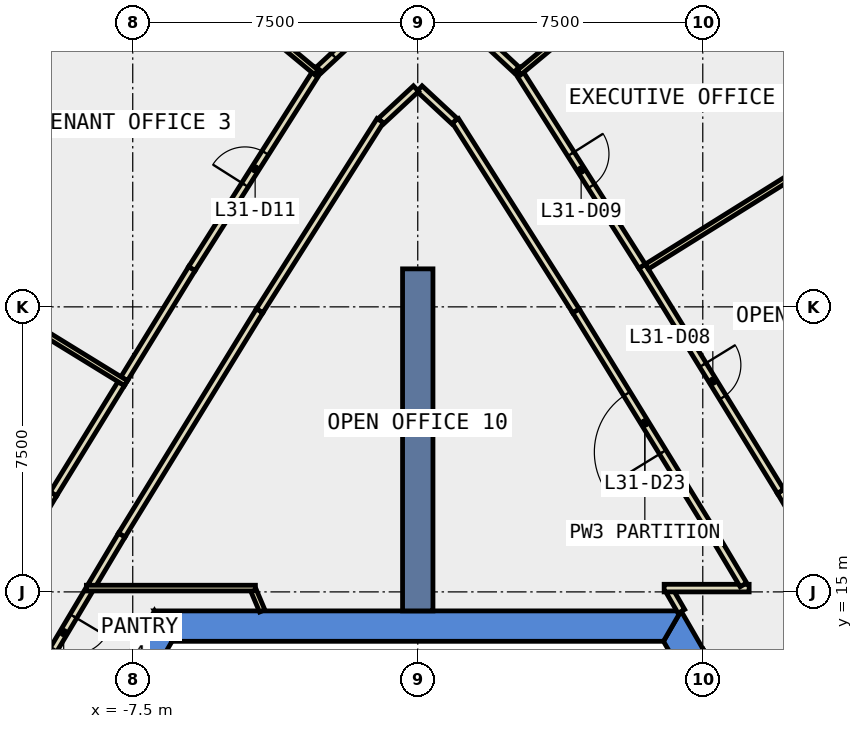
"""IFC4 building model, lengths in metres.
Left out: names, types, materials, properties, quantities, classifications, styles, units other than length and angle.
Written with IfcOpenShell. Run it as: python <this file> out.ifc"""

import sys

from ifc_helpers import new_model, si_unit, direction, frame, frame_2d, origin, place, context, subcontext, project, spatial, polyline, rectangle, outline, extrude, element, fill, save


model = new_model("IFC4")
c1 = context("Model", 3, precision=1e-05, world=origin(), true_north=direction((0.0, 1.0)))
c2 = subcontext(c1, "Body", "Model", "MODEL_VIEW")
j1 = project(units=[si_unit("LENGTHUNIT", "METRE"), si_unit("PLANEANGLEUNIT", "RADIAN")], contexts=[c1])
p1 = place(None, origin())
s1 = spatial("IfcSite", under=j1, at=p1, CompositionType="ELEMENT")
p2 = place(p1, origin())
s2 = spatial("IfcBuilding", under=s1, at=p2, CompositionType="ELEMENT")
p3 = place(p2, frame((0.0, 0.0, 142.4)))
s3 = spatial("IfcBuildingStorey", under=s2, at=p3, CompositionType="ELEMENT", Elevation=142.4)
p4 = place(p3, frame((0.0, 0.0, -0.4)))
e1 = element("IfcWall", 1, at=p4, inside=s3, PredefinedType="SHEAR", context=c2, shape_type="SweptSolid", body=[
    extrude(outline(polyline([(6.824, 13.08), (7.517, 13.48), (6.928, 14.5), (6.466, 13.7), (6.824, 13.08)])), origin(), (0.0, 0.0, 1.0), 4.2),
])
p5 = place(p3, frame((0.0, 0.0, -0.4)))
e2 = element("IfcWall", 2, at=p5, inside=s3, PredefinedType="SHEAR", context=c2, shape_type="SweptSolid", body=[
    extrude(outline(polyline([(6.928, 14.5), (-6.928, 14.5), (-6.466, 13.7), (6.466, 13.7), (6.928, 14.5)])), origin(), (0.0, 0.0, 1.0), 4.2),
])
p6 = place(p3, frame((0.0, 0.0, -0.4)))
e3 = element("IfcWall", 3, at=p6, inside=s3, PredefinedType="SHEAR", context=c2, shape_type="SweptSolid", body=[
    extrude(outline(polyline([(-12.267, 5.252), (-11.575, 4.852), (-6.466, 13.7), (-6.928, 14.5), (-12.267, 5.252)])), origin(), (0.0, 0.0, 1.0), 4.2),
])
p7 = place(p3, frame((0.0, 14.5, -0.4), z_axis=(0.0, 0.0, 1.0), x_axis=(0.0, 1.0, 0.0)))
e4 = element("IfcWall", 4, at=p7, inside=s3, PredefinedType="SHEAR", context=c2, shape_type="SweptSolid", body=[
    extrude(rectangle(XDim=9.0, YDim=0.8, at=frame_2d((4.5, 0.0))), origin(), (0.0, 0.0, 1.0), 4.2),
])
p8 = place(p3, frame((11.375, 27.545, 0.0), z_axis=(0.0, 0.0, 1.0), x_axis=(-0.535403761464, 0.844596242124, 0.0)))
e5 = element("IfcWall", 5, at=p8, inside=s3, PredefinedType="STANDARD", context=c2, shape_type="SweptSolid", body=[
    extrude(rectangle(XDim=5.928, YDim=0.3, at=frame_2d((2.964, 0.0))), origin(), (0.0, 0.0, 1.0), 3.8),
])
p9 = place(p8, frame((0.482, 0.0, 0.9)))
e6 = element("IfcOpeningElement", 6, at=p9, cuts=e5, PredefinedType="OPENING", context=c2, shape_type="SweptSolid", body=[
    extrude(rectangle(XDim=2.0, YDim=2.6, at=frame_2d((1.0, 1.3))), frame((0.0, 0.16, 0.0), z_axis=(0.0, -1.0, 0.0), x_axis=(1.0, 0.0, 0.0)), (0.0, 0.0, 1.0), 0.32),
])
p10 = place(p8, frame((3.446, 0.0, 0.9)))
e7 = element("IfcOpeningElement", 7, at=p10, cuts=e5, PredefinedType="OPENING", context=c2, shape_type="SweptSolid", body=[
    extrude(rectangle(XDim=2.0, YDim=2.6, at=frame_2d((1.0, 1.3))), frame((0.0, 0.16, 0.0), z_axis=(0.0, -1.0, 0.0), x_axis=(1.0, 0.0, 0.0)), (0.0, 0.0, 1.0), 0.32),
])
p11 = place(p3, frame((-8.201, 32.552, 0.0), z_axis=(0.0, 0.0, 1.0), x_axis=(-0.535403761464, -0.844596242124, 0.0)))
e8 = element("IfcWall", 8, at=p11, inside=s3, PredefinedType="STANDARD", context=c2, shape_type="SweptSolid", body=[
    extrude(rectangle(XDim=5.928, YDim=0.3, at=frame_2d((2.964, 0.0))), origin(), (0.0, 0.0, 1.0), 3.8),
])
p12 = place(p11, frame((0.482, 0.0, 0.9)))
e9 = element("IfcOpeningElement", 9, at=p12, cuts=e8, PredefinedType="OPENING", context=c2, shape_type="SweptSolid", body=[
    extrude(rectangle(XDim=2.0, YDim=2.6, at=frame_2d((1.0, 1.3))), frame((0.0, 0.16, 0.0), z_axis=(0.0, -1.0, 0.0), x_axis=(1.0, 0.0, 0.0)), (0.0, 0.0, 1.0), 0.32),
])
p13 = place(p11, frame((3.446, 0.0, 0.9)))
e10 = element("IfcOpeningElement", 10, at=p13, cuts=e8, PredefinedType="OPENING", context=c2, shape_type="SweptSolid", body=[
    extrude(rectangle(XDim=2.0, YDim=2.6, at=frame_2d((1.0, 1.3))), frame((0.0, 0.16, 0.0), z_axis=(0.0, -1.0, 0.0), x_axis=(1.0, 0.0, 0.0)), (0.0, 0.0, 1.0), 0.32),
])
p14 = place(p3, frame((-8.658, 15.036, 0.0), z_axis=(0.0, 0.0, 1.0), x_axis=(-0.511860217954, -0.859068750029, 0.0)))
e11 = element("IfcWall", 11, at=p14, inside=s3, PredefinedType="PARTITIONING", context=c2, shape_type="SweptSolid", body=[
    extrude(rectangle(XDim=2.577, YDim=0.2, at=frame_2d((1.289, 0.0))), origin(), (0.0, 0.0, 1.0), 3.8),
])
p15 = place(p14, frame((0.788, 0.0, 0.0)))
e12 = element("IfcOpeningElement", 12, at=p15, cuts=e11, PredefinedType="OPENING", context=c2, shape_type="SweptSolid", body=[
    extrude(rectangle(XDim=1.0, YDim=2.1, at=frame_2d((0.5, 1.05))), frame((0.0, 0.11, 0.0), z_axis=(0.0, -1.0, 0.0), x_axis=(1.0, 0.0, 0.0)), (0.0, 0.0, 1.0), 0.22),
])
p16 = place(p3, frame((6.937, 14.488, 0.0), z_axis=(0.0, 0.0, 1.0), x_axis=(-0.499908430952, 0.866078264744, 0.0)))
e13 = element("IfcWall", 13, at=p16, inside=s3, PredefinedType="PARTITIONING", context=c2, shape_type="SweptSolid", body=[
    extrude(rectangle(XDim=0.606, YDim=0.2, at=frame_2d((0.303, 0.0))), origin(), (0.0, 0.0, 1.0), 3.8),
])
p17 = place(p3, frame((6.484, 15.1, 0.0), z_axis=(0.0, 0.0, 1.0), x_axis=(1.0, 0.0, 0.0)))
e14 = element("IfcWall", 14, at=p17, inside=s3, PredefinedType="PARTITIONING", context=c2, shape_type="SweptSolid", body=[
    extrude(rectangle(XDim=2.236, YDim=0.2, at=frame_2d((1.118, 0.0))), origin(), (0.0, 0.0, 1.0), 3.8),
])
p18 = place(p3, frame((8.569, 15.186, 0.0), z_axis=(0.0, 0.0, 1.0), x_axis=(-0.512230585803, 0.85884796499, 0.0)))
e15 = element("IfcWall", 15, at=p18, inside=s3, PredefinedType="PARTITIONING", context=c2, shape_type="SweptSolid", body=[
    extrude(rectangle(XDim=1.523, YDim=0.2, at=frame_2d((0.761, 0.0))), origin(), (0.0, 0.0, 1.0), 3.8),
])
p19 = place(p3, frame((7.789, 16.494, 0.0), z_axis=(0.0, 0.0, 1.0), x_axis=(-0.523625371849, 0.851948631055, 0.0)))
e16 = element("IfcWall", 16, at=p19, inside=s3, PredefinedType="PARTITIONING", context=c2, shape_type="SweptSolid", body=[
    extrude(rectangle(XDim=6.927, YDim=0.2, at=frame_2d((3.463, 0.0))), origin(), (0.0, 0.0, 1.0), 3.8),
])
p20 = place(p19, frame((2.564, 0.0, 0.0)))
e17 = element("IfcOpeningElement", 17, at=p20, cuts=e16, PredefinedType="OPENING", context=c2, shape_type="SweptSolid", body=[
    extrude(rectangle(XDim=1.8, YDim=2.1, at=frame_2d((0.9, 1.05))), frame((0.0, 0.11, 0.0), z_axis=(0.0, -1.0, 0.0), x_axis=(1.0, 0.0, 0.0)), (0.0, 0.0, 1.0), 0.22),
])
p21 = place(p3, frame((4.162, 22.395, 0.0), z_axis=(0.0, 0.0, 1.0), x_axis=(-0.535496886312, 0.844537201519, 0.0)))
e18 = element("IfcWall", 18, at=p21, inside=s3, PredefinedType="PARTITIONING", context=c2, shape_type="SweptSolid", body=[
    extrude(rectangle(XDim=5.927, YDim=0.2, at=frame_2d((2.964, 0.0))), origin(), (0.0, 0.0, 1.0), 3.8),
])
for number, where, z_axis, x_axis in (
    (19, (0.968, 27.385, 0.0), (0.0, 0.0, 1.0), (-0.733, 0.681, 0.0)),
    (20, (-0.046, 28.242, 0.0), (0.0, 0.0, 1.0), (-0.733, -0.681, 0.0)),
):
    element("IfcWall", number, at=place(p3, frame(where, z_axis=z_axis, x_axis=x_axis)), inside=s3, PredefinedType="PARTITIONING", context=c2, shape_type="SweptSolid", body=[
        extrude(rectangle(XDim=1.259, YDim=0.2, at=frame_2d((0.629, 0.0))), origin(), (0.0, 0.0, 1.0), 3.8),
    ])
p22 = place(p3, frame((-0.988, 27.401, 0.0), z_axis=(0.0, 0.0, 1.0), x_axis=(-0.535496886312, -0.844537201519, 0.0)))
e21 = element("IfcWall", 21, at=p22, inside=s3, PredefinedType="PARTITIONING", context=c2, shape_type="SweptSolid", body=[
    extrude(rectangle(XDim=5.927, YDim=0.2, at=frame_2d((2.964, 0.0))), origin(), (0.0, 0.0, 1.0), 3.8),
])
p23 = place(p3, frame((-4.162, 22.395, 0.0), z_axis=(0.0, 0.0, 1.0), x_axis=(-0.523625371849, -0.851948631055, 0.0)))
e22 = element("IfcWall", 22, at=p23, inside=s3, PredefinedType="PARTITIONING", context=c2, shape_type="SweptSolid", body=[
    extrude(rectangle(XDim=6.927, YDim=0.2, at=frame_2d((3.463, 0.0))), origin(), (0.0, 0.0, 1.0), 3.8),
])
p24 = place(p3, frame((-7.789, 16.494, 0.0), z_axis=(0.0, 0.0, 1.0), x_axis=(-0.511686277462, -0.859172365394, 0.0)))
e23 = element("IfcWall", 23, at=p24, inside=s3, PredefinedType="PARTITIONING", context=c2, shape_type="SweptSolid", body=[
    extrude(rectangle(XDim=1.548, YDim=0.2, at=frame_2d((0.774, 0.0))), origin(), (0.0, 0.0, 1.0), 3.8),
])
p25 = place(p3, frame((9.548, 17.645, 0.0), z_axis=(0.0, 0.0, 1.0), x_axis=(0.511822081848, -0.859091471575, 0.0)))
e24 = element("IfcWall", 24, at=p25, inside=s3, PredefinedType="PARTITIONING", context=c2, shape_type="SweptSolid", body=[
    extrude(rectangle(XDim=7.03, YDim=0.2, at=frame_2d((3.515, 0.0))), origin(), (0.0, 0.0, 1.0), 3.8),
])
p26 = place(p25, frame((3.015, 0.0, 0.0)))
e25 = element("IfcOpeningElement", 25, at=p26, cuts=e24, PredefinedType="OPENING", context=c2, shape_type="SweptSolid", body=[
    extrude(rectangle(XDim=1.0, YDim=2.1, at=frame_2d((0.5, 1.05))), frame((0.0, 0.11, 0.0), z_axis=(0.0, -1.0, 0.0), x_axis=(1.0, 0.0, 0.0)), (0.0, 0.0, 1.0), 0.22),
])
p27 = place(p3, frame((5.904, 23.571, 0.0), z_axis=(0.0, 0.0, 1.0), x_axis=(0.523647026552, -0.851935321244, 0.0)))
e26 = element("IfcWall", 26, at=p27, inside=s3, PredefinedType="PARTITIONING", context=c2, shape_type="SweptSolid", body=[
    extrude(rectangle(XDim=6.957, YDim=0.2, at=frame_2d((3.479, 0.0))), origin(), (0.0, 0.0, 1.0), 3.8),
])
p28 = place(p27, frame((3.053, 0.0, 0.0)))
e27 = element("IfcOpeningElement", 27, at=p28, cuts=e26, PredefinedType="OPENING", context=c2, shape_type="SweptSolid", body=[
    extrude(rectangle(XDim=1.0, YDim=2.1, at=frame_2d((0.5, 1.05))), frame((0.0, 0.11, 0.0), z_axis=(0.0, -1.0, 0.0), x_axis=(1.0, 0.0, 0.0)), (0.0, 0.0, 1.0), 0.22),
])
p29 = place(p3, frame((2.616, 28.754, 0.0), z_axis=(0.0, 0.0, 1.0), x_axis=(0.535405016332, -0.844595446641, 0.0)))
e28 = element("IfcWall", 28, at=p29, inside=s3, PredefinedType="PARTITIONING", context=c2, shape_type="SweptSolid", body=[
    extrude(rectangle(XDim=6.138, YDim=0.2, at=frame_2d((3.069, 0.0))), origin(), (0.0, 0.0, 1.0), 3.8),
])
p30 = place(p29, frame((2.644, 0.0, 0.0)))
e29 = element("IfcOpeningElement", 29, at=p30, cuts=e28, PredefinedType="OPENING", context=c2, shape_type="SweptSolid", body=[
    extrude(rectangle(XDim=1.0, YDim=2.1, at=frame_2d((0.5, 1.05))), frame((0.0, 0.11, 0.0), z_axis=(0.0, -1.0, 0.0), x_axis=(1.0, 0.0, 0.0)), (0.0, 0.0, 1.0), 0.22),
])
p31 = place(p3, frame((-2.597, 28.738, 0.0), z_axis=(0.0, 0.0, 1.0), x_axis=(0.73206471367, 0.681235095249, 0.0)))
e30 = element("IfcWall", 30, at=p31, inside=s3, PredefinedType="PARTITIONING", context=c2, shape_type="SweptSolid", body=[
    extrude(rectangle(XDim=2.065, YDim=0.2, at=frame_2d((1.033, 0.0))), origin(), (0.0, 0.0, 1.0), 3.8),
])
p32 = place(p31, frame((0.532, 0.0, 0.0)))
e31 = element("IfcOpeningElement", 31, at=p32, cuts=e30, PredefinedType="OPENING", context=c2, shape_type="SweptSolid", body=[
    extrude(rectangle(XDim=1.0, YDim=2.1, at=frame_2d((0.5, 1.05))), frame((0.0, 0.11, 0.0), z_axis=(0.0, -1.0, 0.0), x_axis=(1.0, 0.0, 0.0)), (0.0, 0.0, 1.0), 0.22),
])
p33 = place(p3, frame((1.085, 30.145, 0.0), z_axis=(0.0, 0.0, 1.0), x_axis=(0.73206471367, -0.681235095249, 0.0)))
e32 = element("IfcWall", 32, at=p33, inside=s3, PredefinedType="PARTITIONING", context=c2, shape_type="SweptSolid", body=[
    extrude(rectangle(XDim=2.065, YDim=0.2, at=frame_2d((1.033, 0.0))), origin(), (0.0, 0.0, 1.0), 3.8),
])
p34 = place(p3, frame((-7.725, 20.608, 0.0), z_axis=(0.0, 0.0, 1.0), x_axis=(0.523645038298, 0.851936543333, 0.0)))
e33 = element("IfcWall", 33, at=p34, inside=s3, PredefinedType="PARTITIONING", context=c2, shape_type="SweptSolid", body=[
    extrude(rectangle(XDim=3.403, YDim=0.2, at=frame_2d((1.702, 0.0))), origin(), (0.0, 0.0, 1.0), 3.8),
])
p35 = place(p3, frame((-5.943, 23.507, 0.0), z_axis=(0.0, 0.0, 1.0), x_axis=(0.535529721247, 0.844516380931, 0.0)))
e34 = element("IfcWall", 34, at=p35, inside=s3, PredefinedType="PARTITIONING", context=c2, shape_type="SweptSolid", body=[
    extrude(rectangle(XDim=6.213, YDim=0.2, at=frame_2d((3.106, 0.0))), origin(), (0.0, 0.0, 1.0), 3.8),
])
p36 = place(p35, frame((2.607, 0.0, 0.0)))
e35 = element("IfcOpeningElement", 35, at=p36, cuts=e34, PredefinedType="OPENING", context=c2, shape_type="SweptSolid", body=[
    extrude(rectangle(XDim=1.0, YDim=2.1, at=frame_2d((0.5, 1.05))), frame((0.0, 0.11, 0.0), z_axis=(0.0, -1.0, 0.0), x_axis=(1.0, 0.0, 0.0)), (0.0, 0.0, 1.0), 0.22),
])
p37 = place(p3, frame((-13.184, 11.542, 0.0), z_axis=(0.0, 0.0, 1.0), x_axis=(0.511847713534, 0.859076200433, 0.0)))
e36 = element("IfcWall", 36, at=p37, inside=s3, PredefinedType="PARTITIONING", context=c2, shape_type="SweptSolid", body=[
    extrude(rectangle(XDim=7.03, YDim=0.2, at=frame_2d((3.515, 0.0))), origin(), (0.0, 0.0, 1.0), 3.8),
])
p38 = place(p37, frame((3.015, 0.0, 0.0)))
e37 = element("IfcOpeningElement", 37, at=p38, cuts=e36, PredefinedType="OPENING", context=c2, shape_type="SweptSolid", body=[
    extrude(rectangle(XDim=1.0, YDim=2.1, at=frame_2d((0.5, 1.05))), frame((0.0, 0.11, 0.0), z_axis=(0.0, -1.0, 0.0), x_axis=(1.0, 0.0, 0.0)), (0.0, 0.0, 1.0), 0.22),
])
p39 = place(p3, frame((-9.586, 17.581, 0.0), z_axis=(0.0, 0.0, 1.0), x_axis=(0.523757261565, 0.851867554822, 0.0)))
e38 = element("IfcWall", 38, at=p39, inside=s3, PredefinedType="PARTITIONING", context=c2, shape_type="SweptSolid", body=[
    extrude(rectangle(XDim=3.404, YDim=0.2, at=frame_2d((1.702, 0.0))), origin(), (0.0, 0.0, 1.0), 3.8),
])
p40 = place(p3, frame((-4.272, 15.1, 0.0), z_axis=(0.0, 0.0, 1.0), x_axis=(-1.0, 0.0, 0.0)))
e39 = element("IfcWall", 39, at=p40, inside=s3, PredefinedType="PARTITIONING", context=c2, shape_type="SweptSolid", body=[
    extrude(rectangle(XDim=4.448, YDim=0.15, at=frame_2d((2.224, 0.0))), origin(), (0.0, 0.0, 1.0), 3.8),
])
p41 = place(p3, frame((-4.093, 14.5, 0.0), z_axis=(0.0, 0.0, 1.0), x_axis=(-0.390288929197, 0.92069243059, 0.0)))
e40 = element("IfcWall", 40, at=p41, inside=s3, PredefinedType="PARTITIONING", context=c2, shape_type="SweptSolid", body=[
    extrude(rectangle(XDim=0.577, YDim=0.15, at=frame_2d((0.288, 0.0))), origin(), (0.0, 0.0, 1.0), 3.8),
])
p42 = place(p3, frame((6.028, 23.56, 0.0), z_axis=(0.0, 0.0, 1.0), x_axis=(0.848246841914, 0.529601071734, 0.0)))
e41 = element("IfcWall", 41, at=p42, inside=s3, PredefinedType="PARTITIONING", context=c2, shape_type="SweptSolid", body=[
    extrude(rectangle(XDim=5.13, YDim=0.15, at=frame_2d((2.565, 0.0))), origin(), (0.0, 0.0, 1.0), 3.8),
])
for number, where, z_axis, x_axis in (
    (42, (2.67, 28.67, 0.0), (0.0, 0.0, 1.0), (0.769, 0.639, 0.0)),
    (43, (-2.67, 28.67, 0.0), (0.0, 0.0, 1.0), (-0.769, 0.639, 0.0)),
):
    element("IfcWall", number, at=place(p3, frame(where, z_axis=z_axis, x_axis=x_axis)), inside=s3, PredefinedType="PARTITIONING", context=c2, shape_type="SweptSolid", body=[
        extrude(rectangle(XDim=5.288, YDim=0.15, at=frame_2d((2.644, 0.0))), origin(), (0.0, 0.0, 1.0), 3.8),
    ])
p43 = place(p3, frame((-7.679, 20.492, 0.0), z_axis=(0.0, 0.0, 1.0), x_axis=(-0.851897179877, 0.523709074695, 0.0)))
e44 = element("IfcWall", 44, at=p43, inside=s3, PredefinedType="PARTITIONING", context=c2, shape_type="SweptSolid", body=[
    extrude(rectangle(XDim=6.7, YDim=0.15, at=frame_2d((3.35, 0.0))), origin(), (0.0, 0.0, 1.0), 3.8),
])
p44 = place(p28, origin())
e45 = element("IfcDoor", 45, at=p44, inside=s3, OperationType="SINGLE_SWING_LEFT", PredefinedType="DOOR", context=c2, shape_type="SweptSolid", body=[
    extrude(rectangle(XDim=1.0, YDim=2.1, at=frame_2d((0.5, 1.05))), frame((0.0, 0.025, 0.0), z_axis=(0.0, -1.0, 0.0), x_axis=(1.0, 0.0, 0.0)), (0.0, 0.0, 1.0), 0.05),
])
fill(e27, e45)
p45 = place(p30, origin())
e46 = element("IfcDoor", 46, at=p45, inside=s3, OperationType="SINGLE_SWING_LEFT", PredefinedType="DOOR", context=c2, shape_type="SweptSolid", body=[
    extrude(rectangle(XDim=1.0, YDim=2.1, at=frame_2d((0.5, 1.05))), frame((0.0, 0.025, 0.0), z_axis=(0.0, -1.0, 0.0), x_axis=(1.0, 0.0, 0.0)), (0.0, 0.0, 1.0), 0.05),
])
fill(e29, e46)
p46 = place(p32, origin())
e47 = element("IfcDoor", 47, at=p46, inside=s3, OperationType="SINGLE_SWING_LEFT", PredefinedType="DOOR", context=c2, shape_type="SweptSolid", body=[
    extrude(rectangle(XDim=1.0, YDim=2.1, at=frame_2d((0.5, 1.05))), frame((0.0, 0.025, 0.0), z_axis=(0.0, -1.0, 0.0), x_axis=(1.0, 0.0, 0.0)), (0.0, 0.0, 1.0), 0.05),
])
fill(e31, e47)
p47 = place(p36, origin())
e48 = element("IfcDoor", 48, at=p47, inside=s3, OperationType="SINGLE_SWING_LEFT", PredefinedType="DOOR", context=c2, shape_type="SweptSolid", body=[
    extrude(rectangle(XDim=1.0, YDim=2.1, at=frame_2d((0.5, 1.05))), frame((0.0, 0.025, 0.0), z_axis=(0.0, -1.0, 0.0), x_axis=(1.0, 0.0, 0.0)), (0.0, 0.0, 1.0), 0.05),
])
fill(e35, e48)
p48 = place(p20, origin())
e49 = element("IfcDoor", 49, at=p48, inside=s3, OperationType="DOUBLE_DOOR_SINGLE_SWING", PredefinedType="DOOR", context=c2, shape_type="SweptSolid", body=[
    extrude(rectangle(XDim=1.8, YDim=2.1, at=frame_2d((0.9, 1.05))), frame((0.0, 0.025, 0.0), z_axis=(0.0, -1.0, 0.0), x_axis=(1.0, 0.0, 0.0)), (0.0, 0.0, 1.0), 0.05),
])
fill(e17, e49)
p49 = place(p15, origin())
e50 = element("IfcDoor", 50, at=p49, inside=s3, OperationType="SINGLE_SWING_LEFT", PredefinedType="DOOR", context=c2, shape_type="SweptSolid", body=[
    extrude(rectangle(XDim=1.0, YDim=2.1, at=frame_2d((0.5, 1.05))), frame((0.0, 0.025, 0.0), z_axis=(0.0, -1.0, 0.0), x_axis=(1.0, 0.0, 0.0)), (0.0, 0.0, 1.0), 0.05),
])
fill(e12, e50)
save(model, sys.argv[1])
